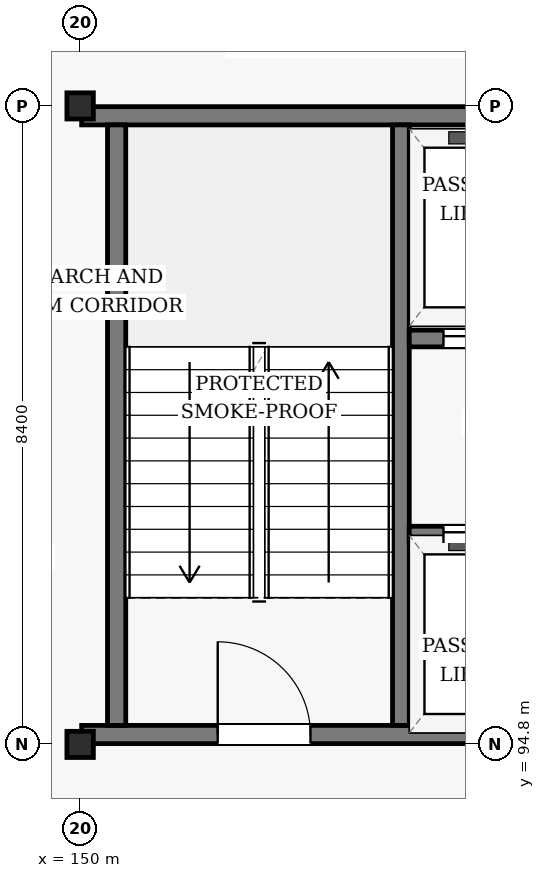
"""IFC4 building model, lengths in metres.
Left out: names, types, materials, properties, quantities, classifications, styles, units other than length and angle.
Written with IfcOpenShell. Run it as: python <this file> out.ifc"""

import sys

from ifc_helpers import new_model, si_unit, direction, frame, frame_2d, origin, origin_2d, place, context, subcontext, project, spatial, rectangle, i_section, extrude, element, fill, save


model = new_model("IFC4")
c1 = context("Model", 3, precision=1e-05, world=origin(), true_north=direction((0.0, 1.0)))
c2 = subcontext(c1, "Body", "Model", "MODEL_VIEW")
j1 = project(units=[si_unit("LENGTHUNIT", "METRE"), si_unit("PLANEANGLEUNIT", "RADIAN")], contexts=[c1])
p1 = place(None, origin())
s1 = spatial("IfcSite", under=j1, at=p1, CompositionType="ELEMENT")
p2 = place(p1, origin())
s2 = spatial("IfcBuilding", under=s1, at=p2, CompositionType="ELEMENT")
p3 = place(p2, frame((0.0, 0.0, 39.6)))
s3 = spatial("IfcBuildingStorey", under=s2, at=p3, CompositionType="ELEMENT", Elevation=39.6)
for number, where, z_axis, x_axis in (
    (1, (150.0, 94.8, 0.0), (0.0, 0.0, 1.0), (1.0, 0.0, 0.0)),
    (2, (150.0, 103.2, 0.0), (0.0, 0.0, 1.0), (1.0, 0.0, 0.0)),
):
    element("IfcColumn", number, at=place(p3, frame(where, z_axis=z_axis, x_axis=x_axis)), inside=s3, PredefinedType="COLUMN", context=c2, shape_type="SweptSolid", body=[
        extrude(i_section(OverallWidth=0.348, OverallDepth=0.344, WebThickness=0.01, FlangeThickness=0.016, FilletRadius=0.02, at=origin_2d()), origin(), (0.0, 0.0, 1.0), 3.6),
    ])
p4 = place(p3, frame((150.02, 94.93, 0.0), z_axis=(0.0, 0.0, 1.0), x_axis=(1.0, 0.0, 0.0)))
e3 = element("IfcWall", 3, at=p4, inside=s3, PredefinedType="SHEAR", context=c2, shape_type="SweptSolid", body=[
    extrude(rectangle(XDim=8.77, YDim=0.24, at=frame_2d((4.385, 0.0))), origin(), (0.0, 0.0, 1.0), 3.342),
])
p5 = place(p4, frame((1.79, 0.0, 0.0)))
e4 = element("IfcOpeningElement", 4, at=p5, cuts=e3, PredefinedType="OPENING", context=c2, shape_type="SweptSolid", body=[
    extrude(rectangle(XDim=1.22, YDim=2.18, at=frame_2d((0.61, 1.09))), frame((0.0, 0.13, 0.0), z_axis=(0.0, -1.0, 0.0), x_axis=(1.0, 0.0, 0.0)), (0.0, 0.0, 1.0), 0.26),
])
p6 = place(p3, frame((150.02, 103.07, 0.0), z_axis=(0.0, 0.0, 1.0), x_axis=(1.0, 0.0, 0.0)))
e5 = element("IfcWall", 5, at=p6, inside=s3, PredefinedType="SHEAR", context=c2, shape_type="SweptSolid", body=[
    extrude(rectangle(XDim=8.77, YDim=0.24, at=frame_2d((4.385, 0.0))), origin(), (0.0, 0.0, 1.0), 3.342),
])
p7 = place(p3, frame((150.48, 95.05, 0.0), z_axis=(0.0, 0.0, 1.0), x_axis=(0.0, 1.0, 0.0)))
e6 = element("IfcWall", 6, at=p7, inside=s3, PredefinedType="SHEAR", context=c2, shape_type="SweptSolid", body=[
    extrude(rectangle(XDim=7.9, YDim=0.24, at=frame_2d((3.95, 0.0))), origin(), (0.0, 0.0, 1.0), 3.342),
])
p8 = place(p3, frame((154.22, 95.05, 0.0), z_axis=(0.0, 0.0, 1.0), x_axis=(0.0, 1.0, 0.0)))
e7 = element("IfcWall", 7, at=p8, inside=s3, PredefinedType="SHEAR", context=c2, shape_type="SweptSolid", body=[
    extrude(rectangle(XDim=7.9, YDim=0.22, at=frame_2d((3.95, 0.0))), origin(), (0.0, 0.0, 1.0), 3.342),
])
p9 = place(p3, frame((154.33, 100.14, 0.0), z_axis=(0.0, 0.0, 1.0), x_axis=(1.0, 0.0, 0.0)))
e8 = element("IfcWall", 8, at=p9, inside=s3, PredefinedType="SHEAR", context=c2, shape_type="SweptSolid", body=[
    extrude(rectangle(XDim=2.0, YDim=0.22, at=frame_2d((1.0, 0.0))), origin(), (0.0, 0.0, 1.0), 3.342),
])
p10 = place(p9, frame((0.45, 0.0, 0.0)))
e9 = element("IfcOpeningElement", 9, at=p10, cuts=e8, PredefinedType="OPENING", context=c2, shape_type="SweptSolid", body=[
    extrude(rectangle(XDim=1.1, YDim=2.15, at=frame_2d((0.55, 1.075))), frame((0.0, 0.12, 0.0), z_axis=(0.0, -1.0, 0.0), x_axis=(1.0, 0.0, 0.0)), (0.0, 0.0, 1.0), 0.24),
])
p11 = place(p3, frame((154.33, 97.56, 0.0), z_axis=(0.0, 0.0, 1.0), x_axis=(1.0, 0.0, 0.0)))
e10 = element("IfcWall", 10, at=p11, inside=s3, PredefinedType="SHEAR", context=c2, shape_type="SweptSolid", body=[
    extrude(rectangle(XDim=2.0, YDim=0.22, at=frame_2d((1.0, 0.0))), origin(), (0.0, 0.0, 1.0), 3.342),
])
p12 = place(p11, frame((0.45, 0.0, 0.0)))
e11 = element("IfcOpeningElement", 11, at=p12, cuts=e10, PredefinedType="OPENING", context=c2, shape_type="SweptSolid", body=[
    extrude(rectangle(XDim=1.1, YDim=2.15, at=frame_2d((0.55, 1.075))), frame((0.0, 0.12, 0.0), z_axis=(0.0, -1.0, 0.0), x_axis=(1.0, 0.0, 0.0)), (0.0, 0.0, 1.0), 0.24),
])
p13 = place(p5, origin())
e12 = element("IfcDoor", 12, at=p13, inside=s3, OperationType="SINGLE_SWING_LEFT", PredefinedType="DOOR", context=c2, shape_type="SweptSolid", body=[
    extrude(rectangle(XDim=1.22, YDim=2.18, at=frame_2d((0.61, 1.09))), frame((0.0, 0.025, 0.0), z_axis=(0.0, -1.0, 0.0), x_axis=(1.0, 0.0, 0.0)), (0.0, 0.0, 1.0), 0.05),
])
fill(e4, e12)
p14 = place(p10, origin())
e13 = element("IfcDoor", 13, at=p14, inside=s3, OperationType="SLIDING_TO_LEFT", PredefinedType="DOOR", context=c2, shape_type="SweptSolid", body=[
    extrude(rectangle(XDim=1.1, YDim=2.15, at=frame_2d((0.55, 1.075))), frame((0.0, 0.025, 0.0), z_axis=(0.0, -1.0, 0.0), x_axis=(1.0, 0.0, 0.0)), (0.0, 0.0, 1.0), 0.05),
])
fill(e9, e13)
p15 = place(p12, origin())
e14 = element("IfcDoor", 14, at=p15, inside=s3, OperationType="SLIDING_TO_LEFT", PredefinedType="DOOR", context=c2, shape_type="SweptSolid", body=[
    extrude(rectangle(XDim=1.1, YDim=2.15, at=frame_2d((0.55, 1.075))), frame((0.0, 0.025, 0.0), z_axis=(0.0, -1.0, 0.0), x_axis=(1.0, 0.0, 0.0)), (0.0, 0.0, 1.0), 0.05),
])
fill(e11, e14)
save(model, sys.argv[1])
